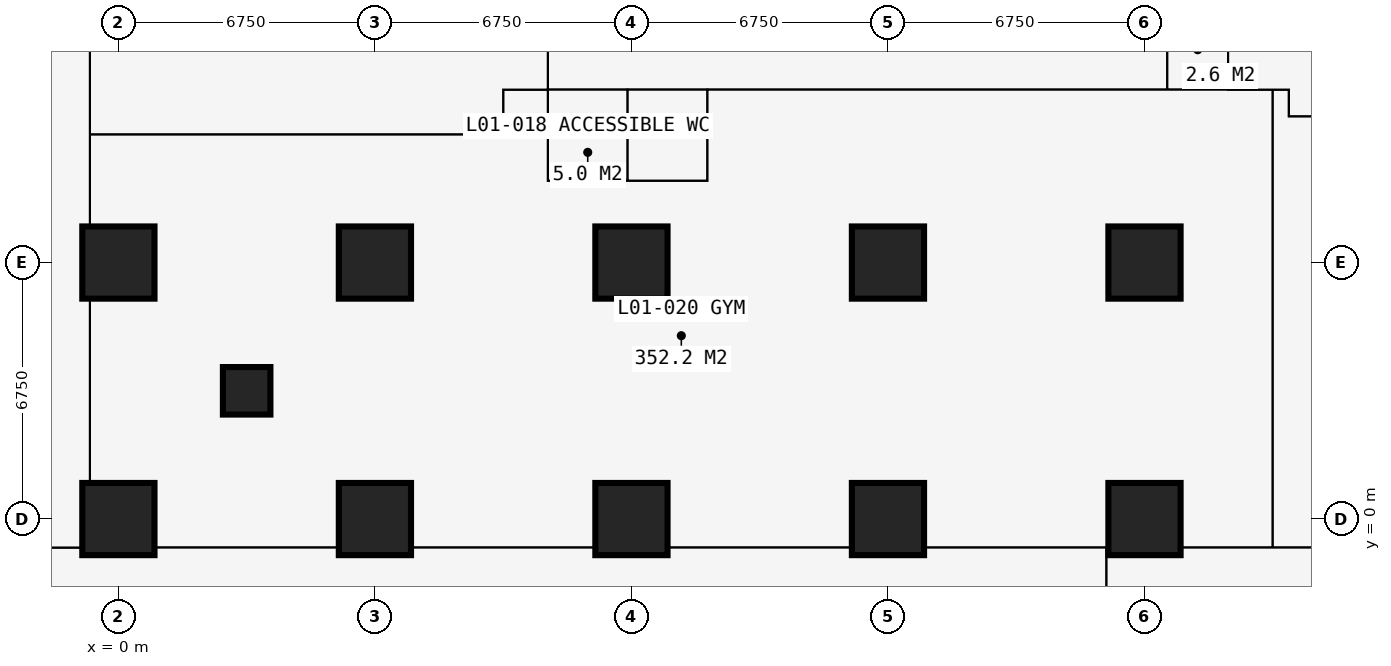
"""IFC4 building model, lengths in metres.
Left out: names, types, materials, properties, quantities, classifications, styles, units other than length and angle.
Written with IfcOpenShell. Run it as: python <this file> out.ifc"""

import sys

from ifc_helpers import new_model, si_unit, direction, frame, frame_2d, origin, origin_2d, place, context, subcontext, project, spatial, rectangle, extrude, element, fill, save


model = new_model("IFC4")
c1 = context("Model", 3, precision=1e-05, world=origin(), true_north=direction((0.0, 1.0)))
c2 = subcontext(c1, "Body", "Model", "MODEL_VIEW")
j1 = project(units=[si_unit("LENGTHUNIT", "METRE"), si_unit("PLANEANGLEUNIT", "RADIAN")], contexts=[c1])
p1 = place(None, origin())
s1 = spatial("IfcSite", under=j1, at=p1, CompositionType="ELEMENT")
p2 = place(p1, origin())
s2 = spatial("IfcBuilding", under=s1, at=p2, CompositionType="ELEMENT")
p3 = place(p2, frame((0.0, 0.0, 4.5)))
s3 = spatial("IfcBuildingStorey", under=s2, at=p3, CompositionType="ELEMENT", Elevation=4.5)
for number, where, z_axis, x_axis in (
    (1, (0.0, 0.0, 0.0), (0.0, 0.0, 1.0), (1.0, 0.0, 0.0)),
    (2, (0.0, 6.75, 0.0), (0.0, 0.0, 1.0), (1.0, 0.0, 0.0)),
):
    element("IfcColumn", number, at=place(p3, frame(where, z_axis=z_axis, x_axis=x_axis)), inside=s3, PredefinedType="COLUMN", context=c2, shape_type="SweptSolid", body=[
        extrude(rectangle(XDim=1.9, YDim=1.9, at=origin_2d()), origin(), (0.0, 0.0, 1.0), 4.5),
    ])
p4 = place(p3, frame((3.375, 3.375, 0.0), z_axis=(0.0, 0.0, 1.0), x_axis=(1.0, 0.0, 0.0)))
e3 = element("IfcColumn", 3, at=p4, inside=s3, PredefinedType="COLUMN", context=c2, shape_type="SweptSolid", body=[
    extrude(rectangle(XDim=1.25, YDim=1.25, at=origin_2d()), origin(), (0.0, 0.0, 1.0), 4.5),
])
for number, where, z_axis, x_axis in (
    (4, (6.75, 0.0, 0.0), (0.0, 0.0, 1.0), (1.0, 0.0, 0.0)),
    (5, (6.75, 6.75, 0.0), (0.0, 0.0, 1.0), (1.0, 0.0, 0.0)),
    (6, (13.5, 0.0, 0.0), (0.0, 0.0, 1.0), (1.0, 0.0, 0.0)),
    (7, (13.5, 6.75, 0.0), (0.0, 0.0, 1.0), (1.0, 0.0, 0.0)),
    (8, (20.25, 0.0, 0.0), (0.0, 0.0, 1.0), (1.0, 0.0, 0.0)),
    (9, (20.25, 6.75, 0.0), (0.0, 0.0, 1.0), (1.0, 0.0, 0.0)),
    (10, (27.0, 0.0, 0.0), (0.0, 0.0, 1.0), (1.0, 0.0, 0.0)),
    (11, (27.0, 6.75, 0.0), (0.0, 0.0, 1.0), (1.0, 0.0, 0.0)),
):
    element("IfcColumn", number, at=place(p3, frame(where, z_axis=z_axis, x_axis=x_axis)), inside=s3, PredefinedType="COLUMN", context=c2, shape_type="SweptSolid", body=[
        extrude(rectangle(XDim=1.9, YDim=1.9, at=origin_2d()), origin(), (0.0, 0.0, 1.0), 4.5),
    ])
p5 = place(p3, frame((-7.484, -0.75, 0.0), z_axis=(0.0, 0.0, 1.0), x_axis=(1.0, 0.0, 0.0)))
e12 = element("IfcWall", 12, at=p5, inside=s3, PredefinedType="PARTITIONING", context=c2, shape_type="SweptSolid", body=[
    extrude(rectangle(XDim=50.334, YDim=0.15, at=frame_2d((25.167, 0.0))), origin(), (0.0, 0.0, 1.0), 4.25),
])
p6 = place(p5, frame((18.384, 0.0, 0.0)))
e13 = element("IfcOpeningElement", 13, at=p6, cuts=e12, PredefinedType="OPENING", context=c2, shape_type="SweptSolid", body=[
    extrude(rectangle(XDim=1.6, YDim=2.4, at=frame_2d((0.8, 1.2))), frame((0.0, 0.085, 0.0), z_axis=(0.0, -1.0, 0.0), x_axis=(1.0, 0.0, 0.0)), (0.0, 0.0, 1.0), 0.17),
])
p7 = place(p5, frame((35.484, 0.0, 0.0)))
e14 = element("IfcOpeningElement", 14, at=p7, cuts=e12, PredefinedType="OPENING", context=c2, shape_type="SweptSolid", body=[
    extrude(rectangle(XDim=1.6, YDim=2.4, at=frame_2d((0.8, 1.2))), frame((0.0, 0.085, 0.0), z_axis=(0.0, -1.0, 0.0), x_axis=(1.0, 0.0, 0.0)), (0.0, 0.0, 1.0), 0.17),
])
p8 = place(p3, frame((-0.75, -0.75, 0.0), z_axis=(0.0, 0.0, 1.0), x_axis=(0.0, 1.0, 0.0)))
e15 = element("IfcWall", 15, at=p8, inside=s3, PredefinedType="PARTITIONING", context=c2, shape_type="SweptSolid", body=[
    extrude(rectangle(XDim=41.984, YDim=0.15, at=frame_2d((20.992, 0.0))), origin(), (0.0, 0.0, 1.0), 4.25),
])
p9 = place(p8, frame((4.65, 0.0, 0.0)))
e16 = element("IfcOpeningElement", 16, at=p9, cuts=e15, PredefinedType="OPENING", context=c2, shape_type="SweptSolid", body=[
    extrude(rectangle(XDim=1.6, YDim=2.4, at=frame_2d((0.8, 1.2))), frame((0.0, 0.085, 0.0), z_axis=(0.0, -1.0, 0.0), x_axis=(1.0, 0.0, 0.0)), (0.0, 0.0, 1.0), 0.17),
])
p10 = place(p3, frame((-0.75, 10.125, 0.0), z_axis=(0.0, 0.0, 1.0), x_axis=(1.0, 0.0, 0.0)))
e17 = element("IfcWall", 17, at=p10, inside=s3, PredefinedType="PARTITIONING", context=c2, shape_type="SweptSolid", body=[
    extrude(rectangle(XDim=10.875, YDim=0.15, at=frame_2d((5.438, 0.0))), origin(), (0.0, 0.0, 1.0), 4.25),
])
p11 = place(p3, frame((10.125, 10.125, 0.0), z_axis=(0.0, 0.0, 1.0), x_axis=(0.0, 1.0, 0.0)))
e18 = element("IfcWall", 18, at=p11, inside=s3, PredefinedType="PARTITIONING", context=c2, shape_type="SweptSolid", body=[
    extrude(rectangle(XDim=1.175, YDim=0.15, at=frame_2d((0.587, 0.0))), origin(), (0.0, 0.0, 1.0), 4.25),
])
p12 = place(p3, frame((10.125, 11.3, 0.0), z_axis=(0.0, 0.0, 1.0), x_axis=(1.0, 0.0, 0.0)))
e19 = element("IfcWall", 19, at=p12, inside=s3, PredefinedType="PARTITIONING", context=c2, shape_type="SweptSolid", body=[
    extrude(rectangle(XDim=20.675, YDim=0.15, at=frame_2d((10.337, 0.0))), origin(), (0.0, 0.0, 1.0), 4.25),
])
p13 = place(p12, frame((1.725, 0.0, 0.0)))
e20 = element("IfcOpeningElement", 20, at=p13, cuts=e19, PredefinedType="OPENING", context=c2, shape_type="SweptSolid", body=[
    extrude(rectangle(XDim=1.0, YDim=2.2, at=frame_2d((0.5, 1.1))), frame((0.0, 0.085, 0.0), z_axis=(0.0, -1.0, 0.0), x_axis=(1.0, 0.0, 0.0)), (0.0, 0.0, 1.0), 0.17),
])
p14 = place(p12, frame((3.825, 0.0, 0.0)))
e21 = element("IfcOpeningElement", 21, at=p14, cuts=e19, PredefinedType="OPENING", context=c2, shape_type="SweptSolid", body=[
    extrude(rectangle(XDim=1.0, YDim=2.2, at=frame_2d((0.5, 1.1))), frame((0.0, 0.085, 0.0), z_axis=(0.0, -1.0, 0.0), x_axis=(1.0, 0.0, 0.0)), (0.0, 0.0, 1.0), 0.17),
])
p15 = place(p12, frame((10.625, 0.0, 0.0)))
e22 = element("IfcOpeningElement", 22, at=p15, cuts=e19, PredefinedType="OPENING", context=c2, shape_type="SweptSolid", body=[
    extrude(rectangle(XDim=1.6, YDim=2.4, at=frame_2d((0.8, 1.2))), frame((0.0, 0.085, 0.0), z_axis=(0.0, -1.0, 0.0), x_axis=(1.0, 0.0, 0.0)), (0.0, 0.0, 1.0), 0.17),
])
p16 = place(p3, frame((11.3, 8.9, 0.0), z_axis=(0.0, 0.0, 1.0), x_axis=(0.0, 1.0, 0.0)))
e23 = element("IfcWall", 23, at=p16, inside=s3, PredefinedType="PARTITIONING", context=c2, shape_type="SweptSolid", body=[
    extrude(rectangle(XDim=21.475, YDim=0.15, at=frame_2d((10.738, 0.0))), origin(), (0.0, 0.0, 1.0), 4.25),
])
p17 = place(p16, frame((16.65, 0.0, 0.0)))
e24 = element("IfcOpeningElement", 24, at=p17, cuts=e23, PredefinedType="OPENING", context=c2, shape_type="SweptSolid", body=[
    extrude(rectangle(XDim=1.0, YDim=2.2, at=frame_2d((0.5, 1.1))), frame((0.0, 0.085, 0.0), z_axis=(0.0, -1.0, 0.0), x_axis=(1.0, 0.0, 0.0)), (0.0, 0.0, 1.0), 0.17),
])
p18 = place(p16, frame((18.75, 0.0, 0.0)))
e25 = element("IfcOpeningElement", 25, at=p18, cuts=e23, PredefinedType="OPENING", context=c2, shape_type="SweptSolid", body=[
    extrude(rectangle(XDim=1.0, YDim=2.2, at=frame_2d((0.5, 1.1))), frame((0.0, 0.085, 0.0), z_axis=(0.0, -1.0, 0.0), x_axis=(1.0, 0.0, 0.0)), (0.0, 0.0, 1.0), 0.17),
])
p19 = place(p16, frame((8.45, 0.0, 0.0)))
e26 = element("IfcOpeningElement", 26, at=p19, cuts=e23, PredefinedType="OPENING", context=c2, shape_type="SweptSolid", body=[
    extrude(rectangle(XDim=1.6, YDim=2.4, at=frame_2d((0.8, 1.2))), frame((0.0, 0.085, 0.0), z_axis=(0.0, -1.0, 0.0), x_axis=(1.0, 0.0, 0.0)), (0.0, 0.0, 1.0), 0.17),
])
p20 = place(p3, frame((11.3, 8.9, 0.0), z_axis=(0.0, 0.0, 1.0), x_axis=(1.0, 0.0, 0.0)))
e27 = element("IfcWall", 27, at=p20, inside=s3, PredefinedType="PARTITIONING", context=c2, shape_type="SweptSolid", body=[
    extrude(rectangle(XDim=4.2, YDim=0.15, at=frame_2d((2.1, 0.0))), origin(), (0.0, 0.0, 1.0), 4.25),
])
p21 = place(p3, frame((13.4, 8.9, 0.0), z_axis=(0.0, 0.0, 1.0), x_axis=(0.0, 1.0, 0.0)))
e28 = element("IfcWall", 28, at=p21, inside=s3, PredefinedType="PARTITIONING", context=c2, shape_type="SweptSolid", body=[
    extrude(rectangle(XDim=2.4, YDim=0.1, at=frame_2d((1.2, 0.0))), origin(), (0.0, 0.0, 1.0), 3.752),
])
p22 = place(p3, frame((15.5, 8.9, 0.0), z_axis=(0.0, 0.0, 1.0), x_axis=(0.0, 1.0, 0.0)))
e29 = element("IfcWall", 29, at=p22, inside=s3, PredefinedType="PARTITIONING", context=c2, shape_type="SweptSolid", body=[
    extrude(rectangle(XDim=2.4, YDim=0.1, at=frame_2d((1.2, 0.0))), origin(), (0.0, 0.0, 1.0), 4.25),
])
p23 = place(p3, frame((26.0, -14.175, 0.0), z_axis=(0.0, 0.0, 1.0), x_axis=(0.0, 1.0, 0.0)))
e30 = element("IfcWall", 30, at=p23, inside=s3, PredefinedType="PARTITIONING", context=c2, shape_type="SweptSolid", body=[
    extrude(rectangle(XDim=13.425, YDim=0.15, at=frame_2d((6.712, 0.0))), origin(), (0.0, 0.0, 1.0), 4.25),
])
p24 = place(p3, frame((27.6, 11.3, 0.0), z_axis=(0.0, 0.0, 1.0), x_axis=(0.0, 1.0, 0.0)))
e31 = element("IfcWall", 31, at=p24, inside=s3, PredefinedType="PARTITIONING", context=c2, shape_type="SweptSolid", body=[
    extrude(rectangle(XDim=1.6, YDim=0.15, at=frame_2d((0.8, 0.0))), origin(), (0.0, 0.0, 1.0), 4.25),
])
p25 = place(p24, frame((0.3, 0.0, 0.0)))
e32 = element("IfcOpeningElement", 32, at=p25, cuts=e31, PredefinedType="OPENING", context=c2, shape_type="SweptSolid", body=[
    extrude(rectangle(XDim=0.95, YDim=2.2, at=frame_2d((0.475, 1.1))), frame((0.0, 0.085, 0.0), z_axis=(0.0, -1.0, 0.0), x_axis=(1.0, 0.0, 0.0)), (0.0, 0.0, 1.0), 0.17),
])
p26 = place(p3, frame((29.2, 11.3, 0.0), z_axis=(0.0, 0.0, 1.0), x_axis=(0.0, 1.0, 0.0)))
e33 = element("IfcWall", 33, at=p26, inside=s3, PredefinedType="PARTITIONING", context=c2, shape_type="SweptSolid", body=[
    extrude(rectangle(XDim=20.3, YDim=0.15, at=frame_2d((10.15, 0.0))), origin(), (0.0, 0.0, 1.0), 4.25),
])
p27 = place(p26, frame((15.35, 0.0, 0.0)))
e34 = element("IfcOpeningElement", 34, at=p27, cuts=e33, PredefinedType="OPENING", context=c2, shape_type="SweptSolid", body=[
    extrude(rectangle(XDim=1.6, YDim=2.4, at=frame_2d((0.8, 1.2))), frame((0.0, 0.085, 0.0), z_axis=(0.0, -1.0, 0.0), x_axis=(1.0, 0.0, 0.0)), (0.0, 0.0, 1.0), 0.17),
])
p28 = place(p26, frame((8.35, 0.0, 0.0)))
e35 = element("IfcOpeningElement", 35, at=p28, cuts=e33, PredefinedType="OPENING", context=c2, shape_type="SweptSolid", body=[
    extrude(rectangle(XDim=1.2, YDim=2.2, at=frame_2d((0.6, 1.1))), frame((0.0, 0.085, 0.0), z_axis=(0.0, -1.0, 0.0), x_axis=(1.0, 0.0, 0.0)), (0.0, 0.0, 1.0), 0.17),
])
p29 = place(p3, frame((30.375, -0.75, 0.0), z_axis=(0.0, 0.0, 1.0), x_axis=(0.0, 1.0, 0.0)))
e36 = element("IfcWall", 36, at=p29, inside=s3, PredefinedType="PARTITIONING", context=c2, shape_type="SweptSolid", body=[
    extrude(rectangle(XDim=12.05, YDim=0.15, at=frame_2d((6.025, 0.0))), origin(), (0.0, 0.0, 1.0), 4.25),
])
p30 = place(p3, frame((30.8, 10.6, 0.0), z_axis=(0.0, 0.0, 1.0), x_axis=(0.0, 1.0, 0.0)))
e37 = element("IfcWall", 37, at=p30, inside=s3, PredefinedType="PARTITIONING", context=c2, shape_type="SweptSolid", body=[
    extrude(rectangle(XDim=0.7, YDim=0.15, at=frame_2d((0.35, 0.0))), origin(), (0.0, 0.0, 1.0), 4.25),
])
p31 = place(p3, frame((30.8, 10.6, 0.0), z_axis=(0.0, 0.0, 1.0), x_axis=(1.0, 0.0, 0.0)))
e38 = element("IfcWall", 38, at=p31, inside=s3, PredefinedType="PARTITIONING", context=c2, shape_type="SweptSolid", body=[
    extrude(rectangle(XDim=1.85, YDim=0.15, at=frame_2d((0.925, 0.0))), origin(), (0.0, 0.0, 1.0), 4.25),
])
p32 = place(p25, origin())
e39 = element("IfcDoor", 39, at=p32, inside=s3, OperationType="SINGLE_SWING_LEFT", PredefinedType="DOOR", context=c2, shape_type="SweptSolid", body=[
    extrude(rectangle(XDim=0.95, YDim=2.2, at=frame_2d((0.475, 1.1))), frame((0.0, 0.025, 0.0), z_axis=(0.0, -1.0, 0.0), x_axis=(1.0, 0.0, 0.0)), (0.0, 0.0, 1.0), 0.05),
])
fill(e32, e39)
p33 = place(p13, origin())
e40 = element("IfcDoor", 40, at=p33, inside=s3, OperationType="SINGLE_SWING_LEFT", PredefinedType="DOOR", context=c2, shape_type="SweptSolid", body=[
    extrude(rectangle(XDim=1.0, YDim=2.2, at=frame_2d((0.5, 1.1))), frame((0.0, 0.025, 0.0), z_axis=(0.0, -1.0, 0.0), x_axis=(1.0, 0.0, 0.0)), (0.0, 0.0, 1.0), 0.05),
])
fill(e20, e40)
p34 = place(p14, origin())
e41 = element("IfcDoor", 41, at=p34, inside=s3, OperationType="SINGLE_SWING_LEFT", PredefinedType="DOOR", context=c2, shape_type="SweptSolid", body=[
    extrude(rectangle(XDim=1.0, YDim=2.2, at=frame_2d((0.5, 1.1))), frame((0.0, 0.025, 0.0), z_axis=(0.0, -1.0, 0.0), x_axis=(1.0, 0.0, 0.0)), (0.0, 0.0, 1.0), 0.05),
])
fill(e21, e41)
p35 = place(p15, origin())
e42 = element("IfcDoor", 42, at=p35, inside=s3, OperationType="DOUBLE_DOOR_SINGLE_SWING", PredefinedType="DOOR", context=c2, shape_type="SweptSolid", body=[
    extrude(rectangle(XDim=1.6, YDim=2.4, at=frame_2d((0.8, 1.2))), frame((0.0, 0.025, 0.0), z_axis=(0.0, -1.0, 0.0), x_axis=(1.0, 0.0, 0.0)), (0.0, 0.0, 1.0), 0.05),
])
fill(e22, e42)
p36 = place(p6, origin())
e43 = element("IfcDoor", 43, at=p36, inside=s3, OperationType="DOUBLE_DOOR_SINGLE_SWING", PredefinedType="DOOR", context=c2, shape_type="SweptSolid", body=[
    extrude(rectangle(XDim=1.6, YDim=2.4, at=frame_2d((0.8, 1.2))), frame((0.0, 0.025, 0.0), z_axis=(0.0, -1.0, 0.0), x_axis=(1.0, 0.0, 0.0)), (0.0, 0.0, 1.0), 0.05),
])
fill(e13, e43)
p37 = place(p7, origin())
e44 = element("IfcDoor", 44, at=p37, inside=s3, OperationType="DOUBLE_DOOR_SINGLE_SWING", PredefinedType="DOOR", context=c2, shape_type="SweptSolid", body=[
    extrude(rectangle(XDim=1.6, YDim=2.4, at=frame_2d((0.8, 1.2))), frame((0.0, 0.025, 0.0), z_axis=(0.0, -1.0, 0.0), x_axis=(1.0, 0.0, 0.0)), (0.0, 0.0, 1.0), 0.05),
])
fill(e14, e44)
p38 = place(p9, origin())
e45 = element("IfcDoor", 45, at=p38, inside=s3, OperationType="DOUBLE_DOOR_SINGLE_SWING", PredefinedType="DOOR", context=c2, shape_type="SweptSolid", body=[
    extrude(rectangle(XDim=1.6, YDim=2.4, at=frame_2d((0.8, 1.2))), frame((0.0, 0.025, 0.0), z_axis=(0.0, -1.0, 0.0), x_axis=(1.0, 0.0, 0.0)), (0.0, 0.0, 1.0), 0.05),
])
fill(e16, e45)
save(model, sys.argv[1])
